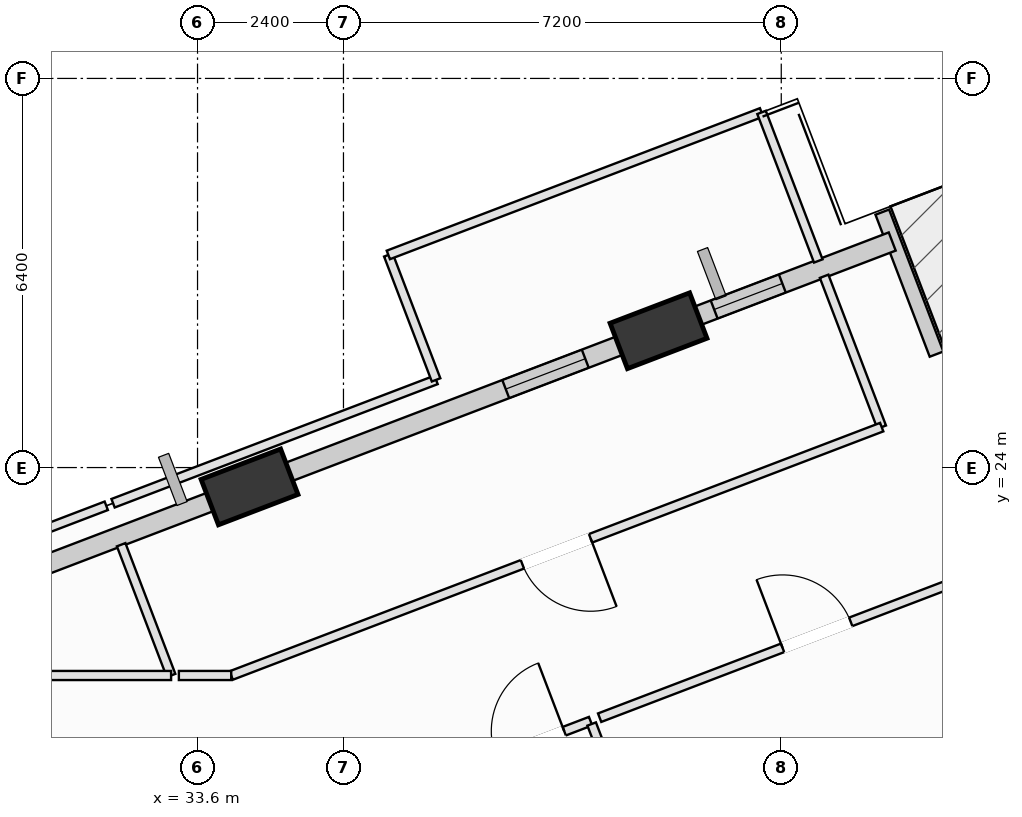
"""IFC4 building model, lengths in metres.
Left out: names, types, materials, properties, quantities, classifications, styles, units other than length and angle.
Written with IfcOpenShell. Run it as: python <this file> out.ifc"""

import sys

from ifc_helpers import new_model, si_unit, direction, frame, frame_2d, origin, origin_2d, place, context, subcontext, project, spatial, rectangle, extrude, element, fill, save


model = new_model("IFC4")
c1 = context("Model", 3, precision=1e-05, world=origin(), true_north=direction((0.0, 1.0)))
c2 = subcontext(c1, "Body", "Model", "MODEL_VIEW")
j1 = project(units=[si_unit("LENGTHUNIT", "METRE"), si_unit("PLANEANGLEUNIT", "RADIAN")], contexts=[c1])
p1 = place(None, origin())
s1 = spatial("IfcSite", under=j1, at=p1, CompositionType="ELEMENT")
p2 = place(p1, origin())
s2 = spatial("IfcBuilding", under=s1, at=p2, CompositionType="ELEMENT")
p3 = place(p2, frame((0.0, 0.0, 112.4)))
s3 = spatial("IfcBuildingStorey", under=s2, at=p3, CompositionType="ELEMENT", Elevation=112.4)
p4 = place(p3, frame((41.182, 26.25, 0.002), z_axis=(-0.006289157671, 0.03138472857, 0.999487591373), x_axis=(-0.845937224, -0.533160225609, 0.011418707428)))
e1 = element("IfcColumn", 1, at=p4, inside=s3, PredefinedType="COLUMN", context=c2, shape_type="SweptSolid", body=[
    extrude(rectangle(XDim=1.4, YDim=0.8, at=origin_2d()), origin(), (0.0, 0.0, 1.0), 3.998),
])
p5 = place(p3, frame((34.455, 23.682, 0.002), z_axis=(0.004581754657, 0.003543223601, 0.999983226405), x_axis=(-0.853691308844, 0.52077526819, 0.002066215567)))
e2 = element("IfcColumn", 2, at=p5, inside=s3, PredefinedType="COLUMN", context=c2, shape_type="SweptSolid", body=[
    extrude(rectangle(XDim=1.4, YDim=0.8, at=origin_2d()), origin(), (0.0, 0.0, 1.0), 3.996),
])
p6 = place(p3, frame((44.862, 28.201, 0.0), z_axis=(0.0, 0.0, 1.0), x_axis=(0.356746506163, -0.934201225829, 0.0)))
e3 = element("IfcWall", 3, at=p6, inside=s3, PredefinedType="SOLIDWALL", context=c2, shape_type="SweptSolid", body=[
    extrude(rectangle(XDim=2.5, YDim=0.24, at=frame_2d((1.25, 0.0))), origin(), (0.0, 0.0, 1.0), 3.165),
])
p7 = place(p3, frame((41.651, 26.429, 0.0), z_axis=(0.0, 0.0, 1.0), x_axis=(0.934195035733, 0.356762715557, 0.0)))
e4 = element("IfcWall", 4, at=p7, inside=s3, PredefinedType="SOLIDWALL", context=c2, shape_type="SweptSolid", body=[
    extrude(rectangle(XDim=3.611, YDim=0.32, at=frame_2d((1.806, 0.0))), origin(), (0.0, 0.0, 1.0), 3.145),
])
p8 = place(p7, frame((0.477, 0.0, 0.75)))
e5 = element("IfcOpeningElement", 5, at=p8, cuts=e4, PredefinedType="OPENING", context=c2, shape_type="SweptSolid", body=[
    extrude(rectangle(XDim=1.2, YDim=1.75, at=frame_2d((0.6, 0.875))), frame((0.0, 0.17, 0.0), z_axis=(0.0, -1.0, 0.0), x_axis=(1.0, 0.0, 0.0)), (0.0, 0.0, 1.0), 0.34),
])
p9 = place(p3, frame((34.929, 23.863, 0.0), z_axis=(0.0, 0.0, 1.0), x_axis=(0.934200999875, 0.356747097861, 0.0)))
e6 = element("IfcWall", 6, at=p9, inside=s3, PredefinedType="SOLIDWALL", context=c2, shape_type="SweptSolid", body=[
    extrude(rectangle(XDim=6.211, YDim=0.32, at=frame_2d((3.105, 0.0))), origin(), (0.0, 0.0, 1.0), 3.165),
])
p10 = place(p9, frame((4.003, 0.0, 0.75)))
e7 = element("IfcOpeningElement", 7, at=p10, cuts=e6, PredefinedType="OPENING", context=c2, shape_type="SweptSolid", body=[
    extrude(rectangle(XDim=1.4, YDim=1.85, at=frame_2d((0.7, 0.925))), frame((0.0, 0.17, 0.0), z_axis=(0.0, -1.0, 0.0), x_axis=(1.0, 0.0, 0.0)), (0.0, 0.0, 1.0), 0.34),
])
p11 = place(p3, frame((28.434, 21.382, 0.0), z_axis=(0.0, 0.0, 1.0), x_axis=(0.934206473055, 0.356732765109, 0.0)))
e8 = element("IfcWall", 8, at=p11, inside=s3, PredefinedType="SOLIDWALL", context=c2, shape_type="SweptSolid", body=[
    extrude(rectangle(XDim=5.96, YDim=0.32, at=frame_2d((2.98, 0.0))), origin(), (0.0, 0.0, 1.0), 3.165),
])
p12 = place(p3, frame((38.077, 19.07, 0.0), z_axis=(0.0, 0.0, 1.0), x_axis=(0.934165524449, 0.356839982248, 0.0)))
e9 = element("IfcWall", 9, at=p12, inside=s3, PredefinedType="PARTITIONING", context=c2, shape_type="SweptSolid", body=[
    extrude(rectangle(XDim=2.127, YDim=0.15, at=frame_2d((1.063, 0.0))), origin(), (0.0, 0.0, 1.0), 2.945),
])
p13 = place(p12, frame((0.463, 0.0, 0.0)))
e10 = element("IfcOpeningElement", 10, at=p13, cuts=e9, PredefinedType="OPENING", context=c2, shape_type="SweptSolid", body=[
    extrude(rectangle(XDim=1.2, YDim=2.15, at=frame_2d((0.6, 1.075))), frame((0.0, 0.085, 0.0), z_axis=(0.0, -1.0, 0.0), x_axis=(1.0, 0.0, 0.0)), (0.0, 0.0, 1.0), 0.17),
])
p14 = place(p3, frame((40.082, 19.782, 0.0), z_axis=(0.0, 0.0, 1.0), x_axis=(0.356731098137, -0.934207109597, 0.0)))
e11 = element("IfcWall", 11, at=p14, inside=s3, PredefinedType="PARTITIONING", context=c2, shape_type="SweptSolid", body=[
    extrude(rectangle(XDim=15.479, YDim=0.15, at=frame_2d((7.74, 0.0))), origin(), (0.0, 0.0, 1.0), 3.78),
])
p15 = place(p3, frame((40.213, 19.886, 0.0), z_axis=(0.0, 0.0, 1.0), x_axis=(0.93423542168, 0.356656945646, 0.0)))
e12 = element("IfcWall", 12, at=p15, inside=s3, PredefinedType="PARTITIONING", context=c2, shape_type="SweptSolid", body=[
    extrude(rectangle(XDim=7.641, YDim=0.15, at=frame_2d((3.82, 0.0))), origin(), (0.0, 0.0, 1.0), 3.78),
])
p16 = place(p15, frame((3.22, 0.0, 0.0)))
e13 = element("IfcOpeningElement", 13, at=p16, cuts=e12, PredefinedType="OPENING", context=c2, shape_type="SweptSolid", body=[
    extrude(rectangle(XDim=1.2, YDim=2.15, at=frame_2d((0.6, 1.075))), frame((0.0, 0.085, 0.0), z_axis=(0.0, -1.0, 0.0), x_axis=(1.0, 0.0, 0.0)), (0.0, 0.0, 1.0), 0.17),
])
p17 = place(p3, frame((28.28, 21.912, 0.0), z_axis=(0.0, 0.0, 1.0), x_axis=(0.934154329461, 0.356869288043, 0.0)))
e14 = element("IfcWall", 14, at=p17, inside=s3, PredefinedType="PARTITIONING", context=c2, shape_type="SweptSolid", body=[
    extrude(rectangle(XDim=4.088, YDim=0.15, at=frame_2d((2.044, 0.0))), origin(), (0.0, 0.0, 1.0), 3.78),
])
p18 = place(p3, frame((32.344, 22.731, 0.0), z_axis=(0.0, 0.0, 1.0), x_axis=(0.356625840628, -0.934247295846, 0.0)))
e15 = element("IfcWall", 15, at=p18, inside=s3, PredefinedType="PARTITIONING", context=c2, shape_type="SweptSolid", body=[
    extrude(rectangle(XDim=2.302, YDim=0.15, at=frame_2d((1.151, 0.0))), origin(), (0.0, 0.0, 1.0), 3.78),
])
p19 = place(p3, frame((33.165, 20.58, 0.0), z_axis=(0.0, 0.0, 1.0), x_axis=(-1.0, 0.0, 0.0)))
e16 = element("IfcWall", 16, at=p19, inside=s3, PredefinedType="PARTITIONING", context=c2, shape_type="SweptSolid", body=[
    extrude(rectangle(XDim=4.56, YDim=0.15, at=frame_2d((2.28, 0.0))), origin(), (0.0, 0.0, 1.0), 3.78),
])
p20 = place(p3, frame((32.211, 23.413, 0.0), z_axis=(0.0, 0.0, 1.0), x_axis=(0.934184043602, 0.356791497487, 0.0)))
e17 = element("IfcWall", 17, at=p20, inside=s3, PredefinedType="PARTITIONING", context=c2, shape_type="SweptSolid", body=[
    extrude(rectangle(XDim=5.686, YDim=0.15, at=frame_2d((2.843, 0.0))), origin(), (0.0, 0.0, 1.0), 3.78),
])
p21 = place(p3, frame((37.523, 25.442, 0.0), z_axis=(0.0, 0.0, 1.0), x_axis=(-0.356784331151, 0.934186780599, 0.0)))
e18 = element("IfcWall", 18, at=p21, inside=s3, PredefinedType="PARTITIONING", context=c2, shape_type="SweptSolid", body=[
    extrude(rectangle(XDim=2.2, YDim=0.15, at=frame_2d((1.1, 0.0))), origin(), (0.0, 0.0, 1.0), 3.78),
])
p22 = place(p3, frame((36.738, 27.497, 0.0), z_axis=(0.0, 0.0, 1.0), x_axis=(0.934197221663, 0.356756991575, 0.0)))
e19 = element("IfcWall", 19, at=p22, inside=s3, PredefinedType="PARTITIONING", context=c2, shape_type="SweptSolid", body=[
    extrude(rectangle(XDim=6.57, YDim=0.15, at=frame_2d((3.285, 0.0))), origin(), (0.0, 0.0, 1.0), 3.78),
])
p23 = place(p3, frame((42.876, 29.841, 0.0), z_axis=(0.0, 0.0, 1.0), x_axis=(0.356794889846, -0.934182747957, 0.0)))
e20 = element("IfcWall", 20, at=p23, inside=s3, PredefinedType="PARTITIONING", context=c2, shape_type="SweptSolid", body=[
    extrude(rectangle(XDim=2.615, YDim=0.15, at=frame_2d((1.308, 0.0))), origin(), (0.0, 0.0, 1.0), 3.78),
])
p24 = place(p3, frame((43.905, 27.146, 0.0), z_axis=(0.0, 0.0, 1.0), x_axis=(0.356618408339, -0.934250132905, 0.0)))
e21 = element("IfcWall", 21, at=p24, inside=s3, PredefinedType="PARTITIONING", context=c2, shape_type="SweptSolid", body=[
    extrude(rectangle(XDim=2.656, YDim=0.15, at=frame_2d((1.328, 0.0))), origin(), (0.0, 0.0, 1.0), 3.78),
])
p25 = place(p3, frame((44.852, 24.665, 0.0), z_axis=(0.0, 0.0, 1.0), x_axis=(-0.934210506375, -0.35672220253, 0.0)))
e22 = element("IfcWall", 22, at=p25, inside=s3, PredefinedType="PARTITIONING", context=c2, shape_type="SweptSolid", body=[
    extrude(rectangle(XDim=11.451, YDim=0.15, at=frame_2d((5.726, 0.0))), origin(), (0.0, 0.0, 1.0), 2.945),
])
p26 = place(p25, frame((5.126, 0.0, 0.0)))
e23 = element("IfcOpeningElement", 23, at=p26, cuts=e22, PredefinedType="OPENING", context=c2, shape_type="SweptSolid", body=[
    extrude(rectangle(XDim=1.2, YDim=2.15, at=frame_2d((0.6, 1.075))), frame((0.0, 0.085, 0.0), z_axis=(0.0, -1.0, 0.0), x_axis=(1.0, 0.0, 0.0)), (0.0, 0.0, 1.0), 0.17),
])
p27 = place(p3, frame((34.154, 20.58, 0.0), z_axis=(0.0, 0.0, 1.0), x_axis=(-1.0, 0.0, 0.0)))
e24 = element("IfcWall", 24, at=p27, inside=s3, PredefinedType="PARTITIONING", context=c2, shape_type="SweptSolid", body=[
    extrude(rectangle(XDim=0.861, YDim=0.15, at=frame_2d((0.431, 0.0))), origin(), (0.0, 0.0, 1.0), 3.78),
])
p28 = place(p8, origin())
e25 = element("IfcWindow", 25, at=p28, inside=s3, PartitioningType="SINGLE_PANEL", PredefinedType="WINDOW", context=c2, shape_type="SweptSolid", body=[
    extrude(rectangle(XDim=1.2, YDim=1.75, at=frame_2d((0.6, 0.875))), frame((0.0, 0.03, 0.0), z_axis=(0.0, -1.0, 0.0), x_axis=(1.0, 0.0, 0.0)), (0.0, 0.0, 1.0), 0.06),
])
fill(e5, e25)
p29 = place(p10, origin())
e26 = element("IfcWindow", 26, at=p29, inside=s3, PartitioningType="SINGLE_PANEL", PredefinedType="WINDOW", context=c2, shape_type="SweptSolid", body=[
    extrude(rectangle(XDim=1.4, YDim=1.85, at=frame_2d((0.7, 0.925))), frame((0.0, 0.03, 0.0), z_axis=(0.0, -1.0, 0.0), x_axis=(1.0, 0.0, 0.0)), (0.0, 0.0, 1.0), 0.06),
])
fill(e7, e26)
p30 = place(p13, origin())
e27 = element("IfcDoor", 27, at=p30, inside=s3, OperationType="SINGLE_SWING_RIGHT", PredefinedType="DOOR", context=c2, shape_type="SweptSolid", body=[
    extrude(rectangle(XDim=1.2, YDim=2.15, at=frame_2d((0.6, 1.075))), frame((0.0, 0.025, 0.0), z_axis=(0.0, -1.0, 0.0), x_axis=(1.0, 0.0, 0.0)), (0.0, 0.0, 1.0), 0.05),
])
fill(e10, e27)
p31 = place(p16, origin())
e28 = element("IfcDoor", 28, at=p31, inside=s3, OperationType="SINGLE_SWING_LEFT", PredefinedType="DOOR", context=c2, shape_type="SweptSolid", body=[
    extrude(rectangle(XDim=1.2, YDim=2.15, at=frame_2d((0.6, 1.075))), frame((0.0, 0.025, 0.0), z_axis=(0.0, -1.0, 0.0), x_axis=(1.0, 0.0, 0.0)), (0.0, 0.0, 1.0), 0.05),
])
fill(e13, e28)
p32 = place(p26, origin())
e29 = element("IfcDoor", 29, at=p32, inside=s3, OperationType="SINGLE_SWING_LEFT", PredefinedType="DOOR", context=c2, shape_type="SweptSolid", body=[
    extrude(rectangle(XDim=1.2, YDim=2.15, at=frame_2d((0.6, 1.075))), frame((0.0, 0.025, 0.0), z_axis=(0.0, -1.0, 0.0), x_axis=(1.0, 0.0, 0.0)), (0.0, 0.0, 1.0), 0.05),
])
fill(e23, e29)
save(model, sys.argv[1])
